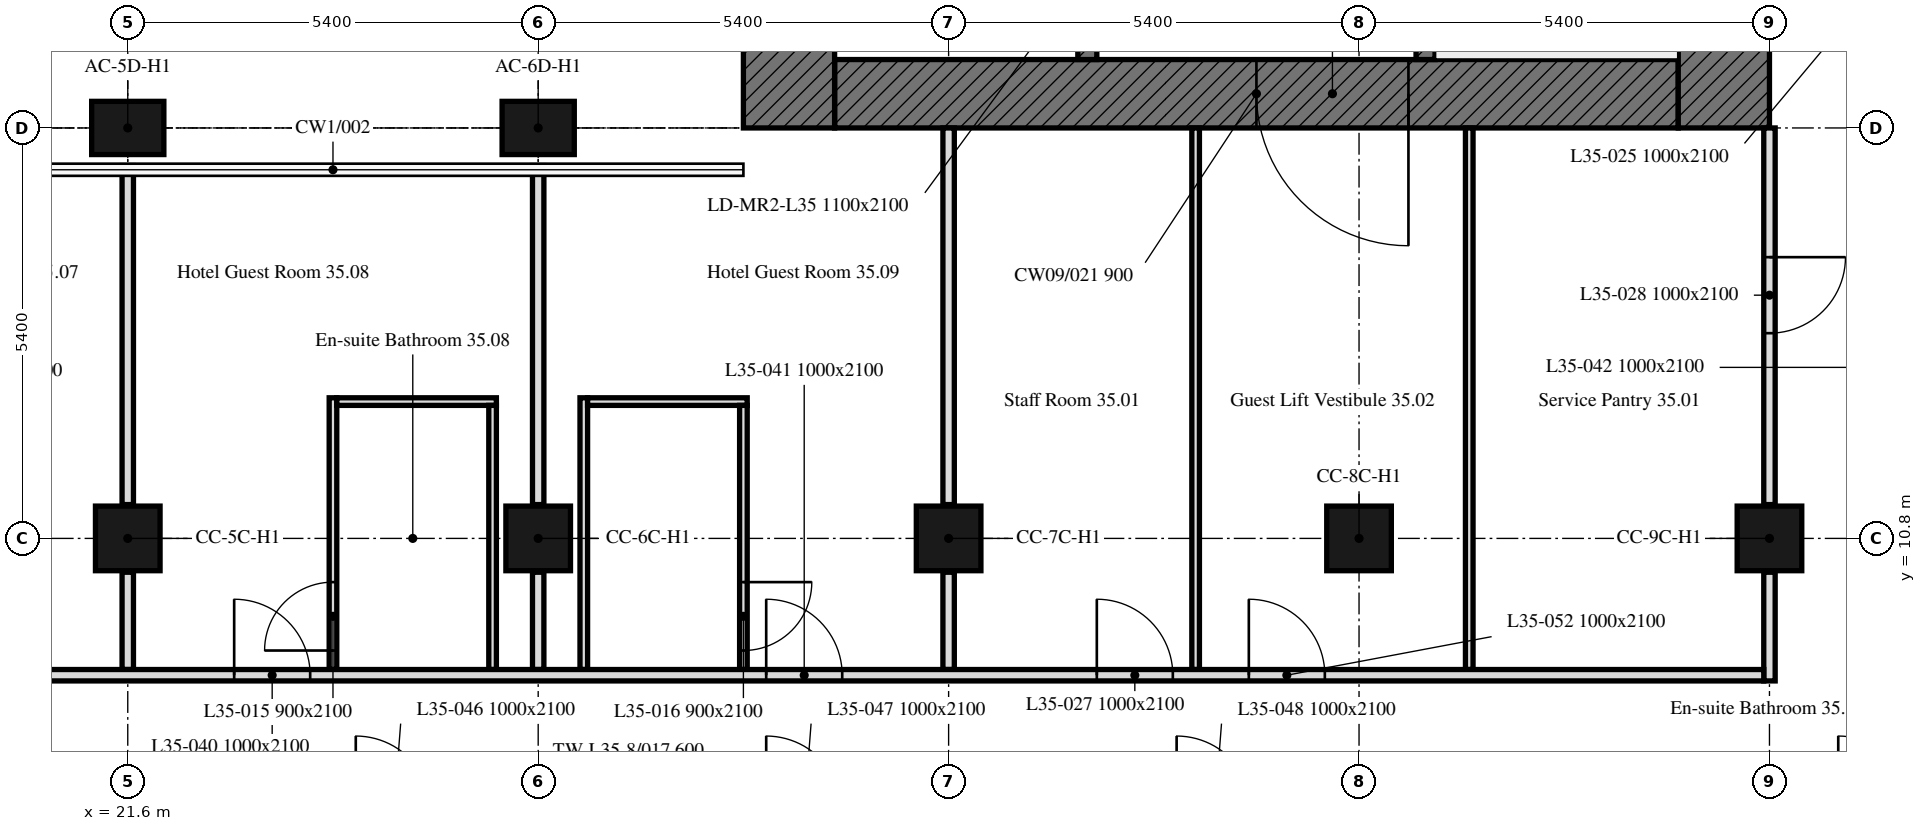
"""IFC4 building model, lengths in metres.
Left out: names, types, materials, properties, quantities, classifications, styles, units other than length and angle.
Written with IfcOpenShell. Run it as: python <this file> out.ifc"""

import sys

from ifc_helpers import new_model, si_unit, direction, frame, frame_2d, origin, origin_2d, place, context, subcontext, project, spatial, rectangle, extrude, element, fill, save


model = new_model("IFC4")
c1 = context("Model", 3, precision=1e-05, world=origin(), true_north=direction((0.0, 1.0)))
c2 = subcontext(c1, "Body", "Model", "MODEL_VIEW")
j1 = project(units=[si_unit("LENGTHUNIT", "METRE"), si_unit("PLANEANGLEUNIT", "RADIAN")], contexts=[c1])
p1 = place(None, origin())
s1 = spatial("IfcSite", under=j1, at=p1, CompositionType="ELEMENT")
p2 = place(p1, origin())
s2 = spatial("IfcBuilding", under=s1, at=p2, CompositionType="ELEMENT")
p3 = place(p2, frame((0.0, 0.0, 152.8)))
s3 = spatial("IfcBuildingStorey", under=s2, at=p3, CompositionType="ELEMENT", Elevation=152.8)
for number, where, z_axis, x_axis in (
    (1, (21.6, 10.8, 0.0), (0.0, 0.0, 1.0), (1.0, 0.0, 0.0)),
    (2, (27.0, 10.8, 0.0), (0.0, 0.0, 1.0), (1.0, 0.0, 0.0)),
    (3, (32.4, 10.8, 0.0), (0.0, 0.0, 1.0), (1.0, 0.0, 0.0)),
    (4, (37.8, 10.8, 0.0), (0.0, 0.0, 1.0), (1.0, 0.0, 0.0)),
    (5, (43.2, 10.8, 0.0), (0.0, 0.0, 1.0), (1.0, 0.0, 0.0)),
):
    element("IfcColumn", number, at=place(p3, frame(where, z_axis=z_axis, x_axis=x_axis)), inside=s3, PredefinedType="COLUMN", context=c2, shape_type="SweptSolid", body=[
        extrude(rectangle(XDim=0.85, YDim=0.85, at=origin_2d()), origin(), (0.0, 0.0, 1.0), 3.0),
    ])
for number, where, z_axis, x_axis in (
    (6, (21.6, 16.2, 0.0), (0.0, 0.0, 1.0), (1.0, 0.0, 0.0)),
    (7, (27.0, 16.2, 0.0), (0.0, 0.0, 1.0), (1.0, 0.0, 0.0)),
):
    element("IfcColumn", number, at=place(p3, frame(where, z_axis=z_axis, x_axis=x_axis)), inside=s3, PredefinedType="COLUMN", context=c2, shape_type="SweptSolid", body=[
        extrude(rectangle(XDim=0.95, YDim=0.7, at=origin_2d()), origin(), (0.0, 0.0, 1.0), 3.0),
    ])
p4 = place(p3, frame((42.0, 16.65, 0.0), z_axis=(0.0, 0.0, 1.0), x_axis=(-1.0, 0.0, 0.0)))
e8 = element("IfcWall", 8, at=p4, inside=s3, PredefinedType="SOLIDWALL", context=c2, shape_type="SweptSolid", body=[
    extrude(rectangle(XDim=11.1, YDim=0.9, at=frame_2d((5.55, 0.0))), origin(), (0.0, 0.0, 1.0), 3.0),
])
p5 = place(p4, frame((3.55, 0.0, 0.0)))
e9 = element("IfcOpeningElement", 9, at=p5, cuts=e8, PredefinedType="OPENING", context=c2, shape_type="SweptSolid", body=[
    extrude(rectangle(XDim=2.0, YDim=2.4, at=frame_2d((1.0, 1.2))), frame((0.0, 0.45, 0.0), z_axis=(0.0, -1.0, 0.0), x_axis=(1.0, 0.0, 0.0)), (0.0, 0.0, 1.0), 0.9),
])
for number, where, z_axis, x_axis in (
    (10, (42.6, 32.4, 0.0), (0.0, 0.0, 1.0), (0.0, -1.0, 0.0)),
    (11, (30.3, 16.2, 0.0), (0.0, 0.0, 1.0), (0.0, 1.0, 0.0)),
):
    element("IfcWall", number, at=place(p3, frame(where, z_axis=z_axis, x_axis=x_axis)), inside=s3, PredefinedType="SOLIDWALL", context=c2, shape_type="SweptSolid", body=[
        extrude(rectangle(XDim=16.2, YDim=1.2, at=frame_2d((8.1, 0.0))), origin(), (0.0, 0.0, 1.0), 3.0),
    ])
p6 = place(p3, frame((38.675, 17.1, 0.0), z_axis=(0.0, 0.0, 1.0), x_axis=(0.0, 1.0, 0.0)))
e12 = element("IfcWall", 12, at=p6, inside=s3, PredefinedType="SOLIDWALL", context=c2, shape_type="SweptSolid", body=[
    extrude(rectangle(XDim=14.4, YDim=0.25, at=frame_2d((7.2, 0.0))), origin(), (0.0, 0.0, 1.0), 3.0),
])
p7 = place(p6, frame((4.6, 0.0, 0.0)))
e13 = element("IfcOpeningElement", 13, at=p7, cuts=e12, PredefinedType="OPENING", context=c2, shape_type="SweptSolid", body=[
    extrude(rectangle(XDim=1.0, YDim=2.1, at=frame_2d((0.5, 1.05))), frame((0.0, 0.125, 0.0), z_axis=(0.0, -1.0, 0.0), x_axis=(1.0, 0.0, 0.0)), (0.0, 0.0, 1.0), 0.25),
])
p8 = place(p6, frame((7.062, 0.0, 0.0)))
e14 = element("IfcOpeningElement", 14, at=p8, cuts=e12, PredefinedType="OPENING", context=c2, shape_type="SweptSolid", body=[
    extrude(rectangle(XDim=1.2, YDim=2.1, at=frame_2d((0.6, 1.05))), frame((0.0, 0.125, 0.0), z_axis=(0.0, -1.0, 0.0), x_axis=(1.0, 0.0, 0.0)), (0.0, 0.0, 1.0), 0.25),
])
p9 = place(p6, frame((9.599, 0.0, 0.0)))
e15 = element("IfcOpeningElement", 15, at=p9, cuts=e12, PredefinedType="OPENING", context=c2, shape_type="SweptSolid", body=[
    extrude(rectangle(XDim=0.9, YDim=2.1, at=frame_2d((0.45, 1.05))), frame((0.0, 0.125, 0.0), z_axis=(0.0, -1.0, 0.0), x_axis=(1.0, 0.0, 0.0)), (0.0, 0.0, 1.0), 0.25),
])
p10 = place(p6, frame((11.032, 0.0, 0.0)))
e16 = element("IfcOpeningElement", 16, at=p10, cuts=e12, PredefinedType="OPENING", context=c2, shape_type="SweptSolid", body=[
    extrude(rectangle(XDim=0.9, YDim=2.1, at=frame_2d((0.45, 1.05))), frame((0.0, 0.125, 0.0), z_axis=(0.0, -1.0, 0.0), x_axis=(1.0, 0.0, 0.0)), (0.0, 0.0, 1.0), 0.25),
])
p11 = place(p6, frame((12.846, 0.0, 0.0)))
e17 = element("IfcOpeningElement", 17, at=p11, cuts=e12, PredefinedType="OPENING", context=c2, shape_type="SweptSolid", body=[
    extrude(rectangle(XDim=0.9, YDim=2.1, at=frame_2d((0.45, 1.05))), frame((0.0, 0.125, 0.0), z_axis=(0.0, -1.0, 0.0), x_axis=(1.0, 0.0, 0.0)), (0.0, 0.0, 1.0), 0.25),
])
p12 = place(p3, frame((34.225, 17.1, 0.0), z_axis=(0.0, 0.0, 1.0), x_axis=(0.0, 1.0, 0.0)))
e18 = element("IfcWall", 18, at=p12, inside=s3, PredefinedType="SOLIDWALL", context=c2, shape_type="SweptSolid", body=[
    extrude(rectangle(XDim=14.4, YDim=0.25, at=frame_2d((7.2, 0.0))), origin(), (0.0, 0.0, 1.0), 3.0),
])
p13 = place(p12, frame((13.15, 0.0, 0.0)))
e19 = element("IfcOpeningElement", 19, at=p13, cuts=e18, PredefinedType="OPENING", context=c2, shape_type="SweptSolid", body=[
    extrude(rectangle(XDim=1.0, YDim=2.1, at=frame_2d((0.5, 1.05))), frame((0.0, 0.125, 0.0), z_axis=(0.0, -1.0, 0.0), x_axis=(1.0, 0.0, 0.0)), (0.0, 0.0, 1.0), 0.25),
])
p14 = place(p12, frame((0.6, 0.0, 0.0)))
e20 = element("IfcOpeningElement", 20, at=p14, cuts=e18, PredefinedType="OPENING", context=c2, shape_type="SweptSolid", body=[
    extrude(rectangle(XDim=1.1, YDim=2.1, at=frame_2d((0.55, 1.05))), frame((0.0, 0.125, 0.0), z_axis=(0.0, -1.0, 0.0), x_axis=(1.0, 0.0, 0.0)), (0.0, 0.0, 1.0), 0.25),
])
p15 = place(p12, frame((3.25, 0.0, 0.0)))
e21 = element("IfcOpeningElement", 21, at=p15, cuts=e18, PredefinedType="OPENING", context=c2, shape_type="SweptSolid", body=[
    extrude(rectangle(XDim=0.9, YDim=2.1, at=frame_2d((0.45, 1.05))), frame((0.0, 0.125, 0.0), z_axis=(0.0, -1.0, 0.0), x_axis=(1.0, 0.0, 0.0)), (0.0, 0.0, 1.0), 0.25),
])
p16 = place(p3, frame((21.6, 9.075, 0.0), z_axis=(0.0, 0.0, 1.0), x_axis=(0.0, 1.0, 0.0)))
e22 = element("IfcWall", 22, at=p16, inside=s3, PredefinedType="PARTITIONING", context=c2, shape_type="SweptSolid", body=[
    extrude(rectangle(XDim=1.28, YDim=0.15, at=frame_2d((0.64, 0.0))), origin(), (0.0, 0.0, 1.0), 2.4),
])
p17 = place(p3, frame((21.6, 11.245, 0.0), z_axis=(0.0, 0.0, 1.0), x_axis=(0.0, 1.0, 0.0)))
e23 = element("IfcWall", 23, at=p17, inside=s3, PredefinedType="PARTITIONING", context=c2, shape_type="SweptSolid", body=[
    extrude(rectangle(XDim=4.46, YDim=0.15, at=frame_2d((2.23, 0.0))), origin(), (0.0, 0.0, 1.0), 2.4),
])
p18 = place(p3, frame((24.3, 9.075, 0.0), z_axis=(0.0, 0.0, 1.0), x_axis=(0.0, 1.0, 0.0)))
e24 = element("IfcWall", 24, at=p18, inside=s3, PredefinedType="PARTITIONING", context=c2, shape_type="SweptSolid", body=[
    extrude(rectangle(XDim=3.575, YDim=0.1, at=frame_2d((1.788, 0.0))), origin(), (0.0, 0.0, 1.0), 3.0),
])
p19 = place(p18, frame((0.25, 0.0, 0.0)))
e25 = element("IfcOpeningElement", 25, at=p19, cuts=e24, PredefinedType="OPENING", context=c2, shape_type="SweptSolid", body=[
    extrude(rectangle(XDim=0.9, YDim=2.1, at=frame_2d((0.45, 1.05))), frame((0.0, 0.05, 0.0), z_axis=(0.0, -1.0, 0.0), x_axis=(1.0, 0.0, 0.0)), (0.0, 0.0, 1.0), 0.1),
])
p20 = place(p3, frame((24.35, 12.6, 0.0), z_axis=(0.0, 0.0, 1.0), x_axis=(1.0, 0.0, 0.0)))
e26 = element("IfcWall", 26, at=p20, inside=s3, PredefinedType="PARTITIONING", context=c2, shape_type="SweptSolid", body=[
    extrude(rectangle(XDim=2.1, YDim=0.1, at=frame_2d((1.05, 0.0))), origin(), (0.0, 0.0, 1.0), 3.0),
])
p21 = place(p3, frame((26.4, 12.55, 0.0), z_axis=(0.0, 0.0, 1.0), x_axis=(0.0, -1.0, 0.0)))
e27 = element("IfcWall", 27, at=p21, inside=s3, PredefinedType="PARTITIONING", context=c2, shape_type="SweptSolid", body=[
    extrude(rectangle(XDim=3.475, YDim=0.1, at=frame_2d((1.738, 0.0))), origin(), (0.0, 0.0, 1.0), 3.0),
])
p22 = place(p3, frame((27.0, 9.075, 0.0), z_axis=(0.0, 0.0, 1.0), x_axis=(0.0, 1.0, 0.0)))
e28 = element("IfcWall", 28, at=p22, inside=s3, PredefinedType="PARTITIONING", context=c2, shape_type="SweptSolid", body=[
    extrude(rectangle(XDim=1.28, YDim=0.15, at=frame_2d((0.64, 0.0))), origin(), (0.0, 0.0, 1.0), 2.4),
])
p23 = place(p3, frame((27.0, 11.245, 0.0), z_axis=(0.0, 0.0, 1.0), x_axis=(0.0, 1.0, 0.0)))
e29 = element("IfcWall", 29, at=p23, inside=s3, PredefinedType="PARTITIONING", context=c2, shape_type="SweptSolid", body=[
    extrude(rectangle(XDim=4.46, YDim=0.15, at=frame_2d((2.23, 0.0))), origin(), (0.0, 0.0, 1.0), 2.4),
])
p24 = place(p3, frame((27.6, 9.075, 0.0), z_axis=(0.0, 0.0, 1.0), x_axis=(0.0, 1.0, 0.0)))
e30 = element("IfcWall", 30, at=p24, inside=s3, PredefinedType="PARTITIONING", context=c2, shape_type="SweptSolid", body=[
    extrude(rectangle(XDim=3.575, YDim=0.1, at=frame_2d((1.788, 0.0))), origin(), (0.0, 0.0, 1.0), 3.0),
])
p25 = place(p3, frame((27.65, 12.6, 0.0), z_axis=(0.0, 0.0, 1.0), x_axis=(1.0, 0.0, 0.0)))
e31 = element("IfcWall", 31, at=p25, inside=s3, PredefinedType="PARTITIONING", context=c2, shape_type="SweptSolid", body=[
    extrude(rectangle(XDim=2.1, YDim=0.1, at=frame_2d((1.05, 0.0))), origin(), (0.0, 0.0, 1.0), 3.0),
])
p26 = place(p3, frame((29.7, 12.55, 0.0), z_axis=(0.0, 0.0, 1.0), x_axis=(0.0, -1.0, 0.0)))
e32 = element("IfcWall", 32, at=p26, inside=s3, PredefinedType="PARTITIONING", context=c2, shape_type="SweptSolid", body=[
    extrude(rectangle(XDim=3.475, YDim=0.1, at=frame_2d((1.738, 0.0))), origin(), (0.0, 0.0, 1.0), 3.0),
])
p27 = place(p26, frame((2.325, 0.0, 0.0)))
e33 = element("IfcOpeningElement", 33, at=p27, cuts=e32, PredefinedType="OPENING", context=c2, shape_type="SweptSolid", body=[
    extrude(rectangle(XDim=0.9, YDim=2.1, at=frame_2d((0.45, 1.05))), frame((0.0, 0.05, 0.0), z_axis=(0.0, -1.0, 0.0), x_axis=(1.0, 0.0, 0.0)), (0.0, 0.0, 1.0), 0.1),
])
p28 = place(p3, frame((32.4, 9.075, 0.0), z_axis=(0.0, 0.0, 1.0), x_axis=(0.0, 1.0, 0.0)))
e34 = element("IfcWall", 34, at=p28, inside=s3, PredefinedType="PARTITIONING", context=c2, shape_type="SweptSolid", body=[
    extrude(rectangle(XDim=1.28, YDim=0.15, at=frame_2d((0.64, 0.0))), origin(), (0.0, 0.0, 1.0), 2.4),
])
p29 = place(p3, frame((32.4, 11.245, 0.0), z_axis=(0.0, 0.0, 1.0), x_axis=(0.0, 1.0, 0.0)))
e35 = element("IfcWall", 35, at=p29, inside=s3, PredefinedType="PARTITIONING", context=c2, shape_type="SweptSolid", body=[
    extrude(rectangle(XDim=4.955, YDim=0.15, at=frame_2d((2.478, 0.0))), origin(), (0.0, 0.0, 1.0), 2.4),
])
for number, where, z_axis, x_axis in (
    (36, (35.65, 16.2, 0.0), (0.0, 0.0, 1.0), (0.0, -1.0, 0.0)),
    (37, (39.25, 9.075, 0.0), (0.0, 0.0, 1.0), (0.0, 1.0, 0.0)),
):
    element("IfcWall", number, at=place(p3, frame(where, z_axis=z_axis, x_axis=x_axis)), inside=s3, PredefinedType="PARTITIONING", context=c2, shape_type="SweptSolid", body=[
        extrude(rectangle(XDim=7.125, YDim=0.1, at=frame_2d((3.562, 0.0))), origin(), (0.0, 0.0, 1.0), 2.4),
    ])
p30 = place(p3, frame((43.2, 16.2, 0.0), z_axis=(0.0, 0.0, 1.0), x_axis=(0.0, -1.0, 0.0)))
e38 = element("IfcWall", 38, at=p30, inside=s3, PredefinedType="PARTITIONING", context=c2, shape_type="SweptSolid", body=[
    extrude(rectangle(XDim=4.955, YDim=0.15, at=frame_2d((2.478, 0.0))), origin(), (0.0, 0.0, 1.0), 3.0),
])
p31 = place(p30, frame((1.7, 0.0, 0.0)))
e39 = element("IfcOpeningElement", 39, at=p31, cuts=e38, PredefinedType="OPENING", context=c2, shape_type="SweptSolid", body=[
    extrude(rectangle(XDim=1.0, YDim=2.1, at=frame_2d((0.5, 1.05))), frame((0.0, 0.075, 0.0), z_axis=(0.0, -1.0, 0.0), x_axis=(1.0, 0.0, 0.0)), (0.0, 0.0, 1.0), 0.15),
])
p32 = place(p3, frame((43.2, 10.355, 0.0), z_axis=(0.0, 0.0, 1.0), x_axis=(0.0, -1.0, 0.0)))
e40 = element("IfcWall", 40, at=p32, inside=s3, PredefinedType="PARTITIONING", context=c2, shape_type="SweptSolid", body=[
    extrude(rectangle(XDim=1.43, YDim=0.15, at=frame_2d((0.715, 0.0))), origin(), (0.0, 0.0, 1.0), 3.0),
])
p33 = place(p3, frame((6.151, 9.0, 0.0), z_axis=(0.0, 0.0, 1.0), x_axis=(1.0, 0.0, 0.0)))
e41 = element("IfcWall", 41, at=p33, inside=s3, PredefinedType="PARTITIONING", context=c2, shape_type="SweptSolid", body=[
    extrude(rectangle(XDim=36.974, YDim=0.15, at=frame_2d((18.487, 0.0))), origin(), (0.0, 0.0, 1.0), 2.4),
])
p34 = place(p33, frame((1.214, 0.0, 0.0)))
e42 = element("IfcOpeningElement", 42, at=p34, cuts=e41, PredefinedType="OPENING", context=c2, shape_type="SweptSolid", body=[
    extrude(rectangle(XDim=1.0, YDim=2.1, at=frame_2d((0.5, 1.05))), frame((0.0, 0.075, 0.0), z_axis=(0.0, -1.0, 0.0), x_axis=(1.0, 0.0, 0.0)), (0.0, 0.0, 1.0), 0.15),
])
p35 = place(p33, frame((28.199, 0.0, 0.0)))
e43 = element("IfcOpeningElement", 43, at=p35, cuts=e41, PredefinedType="OPENING", context=c2, shape_type="SweptSolid", body=[
    extrude(rectangle(XDim=1.0, YDim=2.1, at=frame_2d((0.5, 1.05))), frame((0.0, 0.075, 0.0), z_axis=(0.0, -1.0, 0.0), x_axis=(1.0, 0.0, 0.0)), (0.0, 0.0, 1.0), 0.15),
])
p36 = place(p33, frame((7.099, 0.0, 0.0)))
e44 = element("IfcOpeningElement", 44, at=p36, cuts=e41, PredefinedType="OPENING", context=c2, shape_type="SweptSolid", body=[
    extrude(rectangle(XDim=1.0, YDim=2.1, at=frame_2d((0.5, 1.05))), frame((0.0, 0.075, 0.0), z_axis=(0.0, -1.0, 0.0), x_axis=(1.0, 0.0, 0.0)), (0.0, 0.0, 1.0), 0.15),
])
p37 = place(p33, frame((13.049, 0.0, 0.0)))
e45 = element("IfcOpeningElement", 45, at=p37, cuts=e41, PredefinedType="OPENING", context=c2, shape_type="SweptSolid", body=[
    extrude(rectangle(XDim=1.0, YDim=2.1, at=frame_2d((0.5, 1.05))), frame((0.0, 0.075, 0.0), z_axis=(0.0, -1.0, 0.0), x_axis=(1.0, 0.0, 0.0)), (0.0, 0.0, 1.0), 0.15),
])
p38 = place(p33, frame((16.849, 0.0, 0.0)))
e46 = element("IfcOpeningElement", 46, at=p38, cuts=e41, PredefinedType="OPENING", context=c2, shape_type="SweptSolid", body=[
    extrude(rectangle(XDim=1.0, YDim=2.1, at=frame_2d((0.5, 1.05))), frame((0.0, 0.075, 0.0), z_axis=(0.0, -1.0, 0.0), x_axis=(1.0, 0.0, 0.0)), (0.0, 0.0, 1.0), 0.15),
])
p39 = place(p33, frame((23.849, 0.0, 0.0)))
e47 = element("IfcOpeningElement", 47, at=p39, cuts=e41, PredefinedType="OPENING", context=c2, shape_type="SweptSolid", body=[
    extrude(rectangle(XDim=1.0, YDim=2.1, at=frame_2d((0.5, 1.05))), frame((0.0, 0.075, 0.0), z_axis=(0.0, -1.0, 0.0), x_axis=(1.0, 0.0, 0.0)), (0.0, 0.0, 1.0), 0.15),
])
p40 = place(p33, frame((4.829, 0.0, 0.0)))
e48 = element("IfcOpeningElement", 48, at=p40, cuts=e41, PredefinedType="OPENING", context=c2, shape_type="SweptSolid", body=[
    extrude(rectangle(XDim=1.8, YDim=2.4, at=frame_2d((0.9, 1.2))), frame((0.0, 0.075, 0.0), z_axis=(0.0, -1.0, 0.0), x_axis=(1.0, 0.0, 0.0)), (0.0, 0.0, 1.0), 0.15),
])
p41 = place(p33, frame((30.199, 0.0, 0.0)))
e49 = element("IfcOpeningElement", 49, at=p41, cuts=e41, PredefinedType="OPENING", context=c2, shape_type="SweptSolid", body=[
    extrude(rectangle(XDim=1.0, YDim=2.1, at=frame_2d((0.5, 1.05))), frame((0.0, 0.075, 0.0), z_axis=(0.0, -1.0, 0.0), x_axis=(1.0, 0.0, 0.0)), (0.0, 0.0, 1.0), 0.15),
])
p42 = place(p5, origin())
e50 = element("IfcDoor", 50, at=p42, inside=s3, OperationType="DOUBLE_DOOR_SINGLE_SWING", PredefinedType="DOOR", context=c2, shape_type="SweptSolid", body=[
    extrude(rectangle(XDim=2.0, YDim=2.4, at=frame_2d((1.0, 1.2))), frame((0.0, 0.025, 0.0), z_axis=(0.0, -1.0, 0.0), x_axis=(1.0, 0.0, 0.0)), (0.0, 0.0, 1.0), 0.05),
])
fill(e9, e50)
p43 = place(p19, origin())
e51 = element("IfcDoor", 51, at=p43, inside=s3, OperationType="SINGLE_SWING_LEFT", PredefinedType="DOOR", context=c2, shape_type="SweptSolid", body=[
    extrude(rectangle(XDim=0.9, YDim=2.1, at=frame_2d((0.45, 1.05))), frame((0.0, 0.025, 0.0), z_axis=(0.0, -1.0, 0.0), x_axis=(1.0, 0.0, 0.0)), (0.0, 0.0, 1.0), 0.05),
])
fill(e25, e51)
p44 = place(p27, origin())
e52 = element("IfcDoor", 52, at=p44, inside=s3, OperationType="SINGLE_SWING_RIGHT", PredefinedType="DOOR", context=c2, shape_type="SweptSolid", body=[
    extrude(rectangle(XDim=0.9, YDim=2.1, at=frame_2d((0.45, 1.05))), frame((0.0, 0.025, 0.0), z_axis=(0.0, -1.0, 0.0), x_axis=(1.0, 0.0, 0.0)), (0.0, 0.0, 1.0), 0.05),
])
fill(e33, e52)
p45 = place(p35, origin())
e53 = element("IfcDoor", 53, at=p45, inside=s3, OperationType="SINGLE_SWING_LEFT", PredefinedType="DOOR", context=c2, shape_type="SweptSolid", body=[
    extrude(rectangle(XDim=1.0, YDim=2.1, at=frame_2d((0.5, 1.05))), frame((0.0, 0.025, 0.0), z_axis=(0.0, -1.0, 0.0), x_axis=(1.0, 0.0, 0.0)), (0.0, 0.0, 1.0), 0.05),
])
fill(e43, e53)
p46 = place(p31, origin())
e54 = element("IfcDoor", 54, at=p46, inside=s3, OperationType="SINGLE_SWING_RIGHT", PredefinedType="DOOR", context=c2, shape_type="SweptSolid", body=[
    extrude(rectangle(XDim=1.0, YDim=2.1, at=frame_2d((0.5, 1.05))), frame((0.0, 0.025, 0.0), z_axis=(0.0, -1.0, 0.0), x_axis=(1.0, 0.0, 0.0)), (0.0, 0.0, 1.0), 0.05),
])
fill(e39, e54)
p47 = place(p38, origin())
e55 = element("IfcDoor", 55, at=p47, inside=s3, OperationType="SINGLE_SWING_LEFT", PredefinedType="DOOR", context=c2, shape_type="SweptSolid", body=[
    extrude(rectangle(XDim=1.0, YDim=2.1, at=frame_2d((0.5, 1.05))), frame((0.0, 0.025, 0.0), z_axis=(0.0, -1.0, 0.0), x_axis=(1.0, 0.0, 0.0)), (0.0, 0.0, 1.0), 0.05),
])
fill(e46, e55)
p48 = place(p39, origin())
e56 = element("IfcDoor", 56, at=p48, inside=s3, OperationType="SINGLE_SWING_RIGHT", PredefinedType="DOOR", context=c2, shape_type="SweptSolid", body=[
    extrude(rectangle(XDim=1.0, YDim=2.1, at=frame_2d((0.5, 1.05))), frame((0.0, 0.025, 0.0), z_axis=(0.0, -1.0, 0.0), x_axis=(1.0, 0.0, 0.0)), (0.0, 0.0, 1.0), 0.05),
])
fill(e47, e56)
p49 = place(p41, origin())
e57 = element("IfcDoor", 57, at=p49, inside=s3, OperationType="SINGLE_SWING_LEFT", PredefinedType="DOOR", context=c2, shape_type="SweptSolid", body=[
    extrude(rectangle(XDim=1.0, YDim=2.1, at=frame_2d((0.5, 1.05))), frame((0.0, 0.025, 0.0), z_axis=(0.0, -1.0, 0.0), x_axis=(1.0, 0.0, 0.0)), (0.0, 0.0, 1.0), 0.05),
])
fill(e49, e57)
save(model, sys.argv[1])
